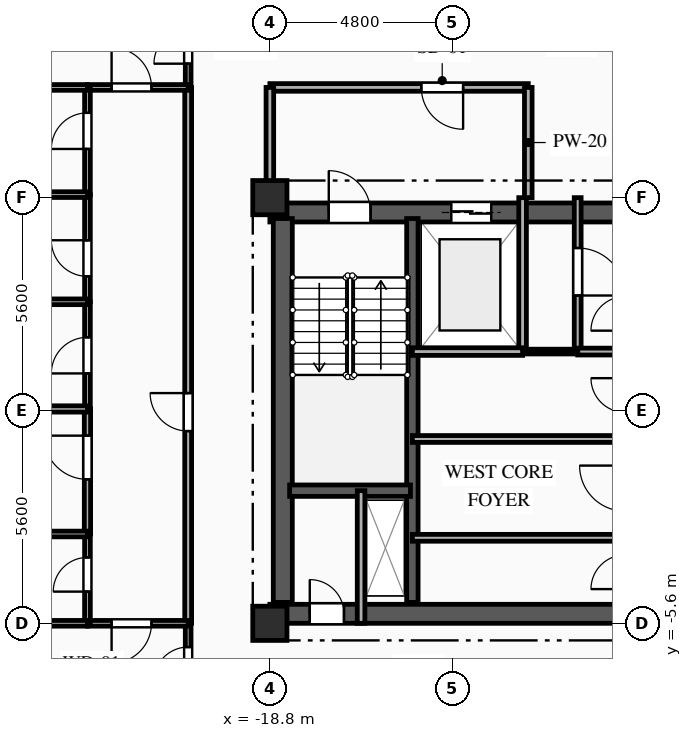
"""IFC4 building model, lengths in metres.
Left out: names, types, materials, properties, quantities, classifications, styles, units other than length and angle.
Written with IfcOpenShell. Run it as: python <this file> out.ifc"""

import sys

from ifc_helpers import new_model, si_unit, direction, frame, frame_2d, origin, origin_2d, place, context, subcontext, project, spatial, rectangle, extrude, element, fill, save


model = new_model("IFC4")
c1 = context("Model", 3, precision=1e-05, world=origin(), true_north=direction((0.0, 1.0)))
c2 = subcontext(c1, "Body", "Model", "MODEL_VIEW")
j1 = project(units=[si_unit("LENGTHUNIT", "METRE"), si_unit("PLANEANGLEUNIT", "RADIAN")], contexts=[c1])
p1 = place(None, origin())
s1 = spatial("IfcSite", under=j1, at=p1, CompositionType="ELEMENT")
p2 = place(p1, origin())
s2 = spatial("IfcBuilding", under=s1, at=p2, CompositionType="ELEMENT")
p3 = place(p2, frame((0.0, 0.0, 134.35)))
s3 = spatial("IfcBuildingStorey", under=s2, at=p3, CompositionType="ELEMENT", Elevation=134.35)
for number, where, z_axis, x_axis in (
    (1, (-18.8, -5.6, 0.0), (0.0, 0.0, 1.0), (1.0, 0.0, 0.0)),
    (2, (-18.8, 5.6, 0.0), (0.0, 0.0, 1.0), (1.0, 0.0, 0.0)),
):
    element("IfcColumn", number, at=place(p3, frame(where, z_axis=z_axis, x_axis=x_axis)), inside=s3, PredefinedType="COLUMN", context=c2, shape_type="SweptSolid", body=[
        extrude(rectangle(XDim=0.9, YDim=0.9, at=origin_2d()), origin(), (0.0, 0.0, 1.0), 3.35),
    ])
p4 = place(p3, frame((-18.8, 5.21, 0.0), z_axis=(0.0, 0.0, 1.0), x_axis=(1.0, 0.0, 0.0)))
e3 = element("IfcWall", 3, at=p4, inside=s3, PredefinedType="SHEAR", context=c2, shape_type="SweptSolid", body=[
    extrude(rectangle(XDim=9.6, YDim=0.5, at=frame_2d((4.8, 0.0))), origin(), (0.0, 0.0, 1.0), 3.04),
])
p5 = place(p4, frame((1.55, 0.0, 0.0)))
e4 = element("IfcOpeningElement", 4, at=p5, cuts=e3, PredefinedType="OPENING", context=c2, shape_type="SweptSolid", body=[
    extrude(rectangle(XDim=1.1, YDim=2.15, at=frame_2d((0.55, 1.075))), frame((0.0, 0.26, 0.0), z_axis=(0.0, -1.0, 0.0), x_axis=(1.0, 0.0, 0.0)), (0.0, 0.0, 1.0), 0.52),
])
p6 = place(p4, frame((4.775, 0.0, 0.0)))
e5 = element("IfcOpeningElement", 5, at=p6, cuts=e3, PredefinedType="OPENING", context=c2, shape_type="SweptSolid", body=[
    extrude(rectangle(XDim=1.05, YDim=2.1, at=frame_2d((0.525, 1.05))), frame((0.0, 0.26, 0.0), z_axis=(0.0, -1.0, 0.0), x_axis=(1.0, 0.0, 0.0)), (0.0, 0.0, 1.0), 0.52),
])
p7 = place(p3, frame((-18.8, -5.35, 0.0), z_axis=(0.0, 0.0, 1.0), x_axis=(1.0, 0.0, 0.0)))
e6 = element("IfcWall", 6, at=p7, inside=s3, PredefinedType="SHEAR", context=c2, shape_type="SweptSolid", body=[
    extrude(rectangle(XDim=9.6, YDim=0.5, at=frame_2d((4.8, 0.0))), origin(), (0.0, 0.0, 1.0), 3.04),
])
p8 = place(p7, frame((1.05, 0.0, 0.0)))
e7 = element("IfcOpeningElement", 7, at=p8, cuts=e6, PredefinedType="OPENING", context=c2, shape_type="SweptSolid", body=[
    extrude(rectangle(XDim=0.9, YDim=2.1, at=frame_2d((0.45, 1.05))), frame((0.0, 0.26, 0.0), z_axis=(0.0, -1.0, 0.0), x_axis=(1.0, 0.0, 0.0)), (0.0, 0.0, 1.0), 0.52),
])
p9 = place(p3, frame((-18.46, -5.05, 0.0), z_axis=(0.0, 0.0, 1.0), x_axis=(0.0, 1.0, 0.0)))
e8 = element("IfcWall", 8, at=p9, inside=s3, PredefinedType="SHEAR", context=c2, shape_type="SweptSolid", body=[
    extrude(rectangle(XDim=10.1, YDim=0.5, at=frame_2d((5.05, 0.0))), origin(), (0.0, 0.0, 1.0), 3.04),
])
p10 = place(p3, frame((-15.05, -5.05, 0.0), z_axis=(0.0, 0.0, 1.0), x_axis=(0.0, 1.0, 0.0)))
e9 = element("IfcWall", 9, at=p10, inside=s3, PredefinedType="SHEAR", context=c2, shape_type="SweptSolid", body=[
    extrude(rectangle(XDim=10.1, YDim=0.3, at=frame_2d((5.05, 0.0))), origin(), (0.0, 0.0, 1.0), 3.04),
])
p11 = place(p3, frame((-18.28, -2.11, 0.0), z_axis=(0.0, 0.0, 1.0), x_axis=(1.0, 0.0, 0.0)))
e10 = element("IfcWall", 10, at=p11, inside=s3, PredefinedType="SHEAR", context=c2, shape_type="SweptSolid", body=[
    extrude(rectangle(XDim=3.18, YDim=0.3, at=frame_2d((1.59, 0.0))), origin(), (0.0, 0.0, 1.0), 3.04),
])
p12 = place(p3, frame((-16.4, -5.6, 0.0), z_axis=(0.0, 0.0, 1.0), x_axis=(0.0, 1.0, 0.0)))
e11 = element("IfcWall", 11, at=p12, inside=s3, PredefinedType="PARTITIONING", context=c2, shape_type="SweptSolid", body=[
    extrude(rectangle(XDim=3.49, YDim=0.2, at=frame_2d((1.745, 0.0))), origin(), (0.0, 0.0, 1.0), 3.04),
])
p13 = place(p3, frame((-12.15, 1.55, 0.0), z_axis=(0.0, 0.0, 1.0), x_axis=(0.0, 1.0, 0.0)))
e12 = element("IfcWall", 12, at=p13, inside=s3, PredefinedType="PARTITIONING", context=c2, shape_type="SweptSolid", body=[
    extrude(rectangle(XDim=4.05, YDim=0.2, at=frame_2d((2.025, 0.0))), origin(), (0.0, 0.0, 1.0), 3.04),
])
p14 = place(p3, frame((-12.0, 8.5, 0.0), z_axis=(0.0, 0.0, 1.0), x_axis=(-1.0, 0.0, 0.0)))
e13 = element("IfcWall", 13, at=p14, inside=s3, PredefinedType="PARTITIONING", context=c2, shape_type="SweptSolid", body=[
    extrude(rectangle(XDim=6.8, YDim=0.2, at=frame_2d((3.4, 0.0))), origin(), (0.0, 0.0, 1.0), 3.04),
])
p15 = place(p14, frame((1.715, 0.0, 0.0)))
e14 = element("IfcOpeningElement", 14, at=p15, cuts=e13, PredefinedType="OPENING", context=c2, shape_type="SweptSolid", body=[
    extrude(rectangle(XDim=1.1, YDim=2.15, at=frame_2d((0.55, 1.075))), frame((0.0, 0.11, 0.0), z_axis=(0.0, -1.0, 0.0), x_axis=(1.0, 0.0, 0.0)), (0.0, 0.0, 1.0), 0.22),
])
p16 = place(p3, frame((-18.8, 8.5, 0.0), z_axis=(0.0, 0.0, 1.0), x_axis=(0.0, -1.0, 0.0)))
e15 = element("IfcWall", 15, at=p16, inside=s3, PredefinedType="PARTITIONING", context=c2, shape_type="SweptSolid", body=[
    extrude(rectangle(XDim=2.9, YDim=0.2, at=frame_2d((1.45, 0.0))), origin(), (0.0, 0.0, 1.0), 2.525),
])
p17 = place(p3, frame((-12.0, 5.6, 0.0), z_axis=(0.0, 0.0, 1.0), x_axis=(0.0, 1.0, 0.0)))
e16 = element("IfcWall", 16, at=p17, inside=s3, PredefinedType="PARTITIONING", context=c2, shape_type="SweptSolid", body=[
    extrude(rectangle(XDim=2.9, YDim=0.2, at=frame_2d((1.45, 0.0))), origin(), (0.0, 0.0, 1.0), 3.04),
])
p18 = place(p3, frame((-10.7, 5.6, 0.0), z_axis=(0.0, 0.0, 1.0), x_axis=(0.0, -1.0, 0.0)))
e17 = element("IfcWall", 17, at=p18, inside=s3, PredefinedType="PARTITIONING", context=c2, shape_type="SweptSolid", body=[
    extrude(rectangle(XDim=4.05, YDim=0.18, at=frame_2d((2.025, 0.0))), origin(), (0.0, 0.0, 1.0), 3.04),
])
p19 = place(p18, frame((1.325, 0.0, 0.0)))
e18 = element("IfcOpeningElement", 18, at=p19, cuts=e17, PredefinedType="OPENING", context=c2, shape_type="SweptSolid", body=[
    extrude(rectangle(XDim=1.25, YDim=2.2, at=frame_2d((0.625, 1.1))), frame((0.0, 0.1, 0.0), z_axis=(0.0, -1.0, 0.0), x_axis=(1.0, 0.0, 0.0)), (0.0, 0.0, 1.0), 0.2),
])
p20 = place(p3, frame((-10.7, 1.55, 0.0), z_axis=(0.0, 0.0, 1.0), x_axis=(1.0, 0.0, 0.0)))
e19 = element("IfcWall", 19, at=p20, inside=s3, PredefinedType="PARTITIONING", context=c2, shape_type="SweptSolid", body=[
    extrude(rectangle(XDim=1.5, YDim=0.18, at=frame_2d((0.75, 0.0))), origin(), (0.0, 0.0, 1.0), 3.04),
])
p21 = place(p3, frame((-12.15, 1.55, 0.0), z_axis=(0.0, 0.0, 1.0), x_axis=(1.0, 0.0, 0.0)))
e20 = element("IfcWall", 20, at=p21, inside=s3, PredefinedType="PARTITIONING", context=c2, shape_type="SweptSolid", body=[
    extrude(rectangle(XDim=1.45, YDim=0.125, at=frame_2d((0.725, 0.0))), origin(), (0.0, 0.0, 1.0), 3.04),
])
p22 = place(p3, frame((-15.05, -3.35, 0.0), z_axis=(0.0, 0.0, 1.0), x_axis=(1.0, 0.0, 0.0)))
e21 = element("IfcWall", 21, at=p22, inside=s3, PredefinedType="PARTITIONING", context=c2, shape_type="SweptSolid", body=[
    extrude(rectangle(XDim=5.85, YDim=0.18, at=frame_2d((2.925, 0.0))), origin(), (0.0, 0.0, 1.0), 2.755),
])
p23 = place(p3, frame((-9.2, -0.75, 0.0), z_axis=(0.0, 0.0, 1.0), x_axis=(-1.0, 0.0, 0.0)))
e22 = element("IfcWall", 22, at=p23, inside=s3, PredefinedType="PARTITIONING", context=c2, shape_type="SweptSolid", body=[
    extrude(rectangle(XDim=5.85, YDim=0.18, at=frame_2d((2.925, 0.0))), origin(), (0.0, 0.0, 1.0), 3.04),
])
p24 = place(p3, frame((-20.95, 8.5, 0.0), z_axis=(0.0, 0.0, 1.0), x_axis=(0.0, 1.0, 0.0)))
e23 = element("IfcWall", 23, at=p24, inside=s3, PredefinedType="PARTITIONING", context=c2, shape_type="SweptSolid", body=[
    extrude(rectangle(XDim=2.15, YDim=0.15, at=frame_2d((1.075, 0.0))), origin(), (0.0, 0.0, 1.0), 3.04),
])
p25 = place(p24, frame((0.625, 0.0, 0.0)))
e24 = element("IfcOpeningElement", 24, at=p25, cuts=e23, PredefinedType="OPENING", context=c2, shape_type="SweptSolid", body=[
    extrude(rectangle(XDim=0.9, YDim=2.1, at=frame_2d((0.45, 1.05))), frame((0.0, 0.085, 0.0), z_axis=(0.0, -1.0, 0.0), x_axis=(1.0, 0.0, 0.0)), (0.0, 0.0, 1.0), 0.17),
])
p26 = place(p3, frame((-20.95, -7.75, 0.0), z_axis=(0.0, 0.0, 1.0), x_axis=(0.0, 1.0, 0.0)))
e25 = element("IfcWall", 25, at=p26, inside=s3, PredefinedType="PARTITIONING", context=c2, shape_type="SweptSolid", body=[
    extrude(rectangle(XDim=2.15, YDim=0.15, at=frame_2d((1.075, 0.0))), origin(), (0.0, 0.0, 1.0), 3.04),
])
p27 = place(p26, frame((0.625, 0.0, 0.0)))
e26 = element("IfcOpeningElement", 26, at=p27, cuts=e25, PredefinedType="OPENING", context=c2, shape_type="SweptSolid", body=[
    extrude(rectangle(XDim=0.9, YDim=2.1, at=frame_2d((0.45, 1.05))), frame((0.0, 0.085, 0.0), z_axis=(0.0, -1.0, 0.0), x_axis=(1.0, 0.0, 0.0)), (0.0, 0.0, 1.0), 0.17),
])
p28 = place(p3, frame((-20.95, -5.6, 0.0), z_axis=(0.0, 0.0, 1.0), x_axis=(0.0, 1.0, 0.0)))
e27 = element("IfcWall", 27, at=p28, inside=s3, PredefinedType="PARTITIONING", context=c2, shape_type="SweptSolid", body=[
    extrude(rectangle(XDim=14.1, YDim=0.18, at=frame_2d((7.05, 0.0))), origin(), (0.0, 0.0, 1.0), 3.04),
])
p29 = place(p28, frame((5.058, 0.0, 0.0)))
e28 = element("IfcOpeningElement", 28, at=p29, cuts=e27, PredefinedType="OPENING", context=c2, shape_type="SweptSolid", body=[
    extrude(rectangle(XDim=1.0, YDim=2.15, at=frame_2d((0.5, 1.075))), frame((0.0, 0.1, 0.0), z_axis=(0.0, -1.0, 0.0), x_axis=(1.0, 0.0, 0.0)), (0.0, 0.0, 1.0), 0.2),
])
p30 = place(p3, frame((-23.6, 8.5, 0.0), z_axis=(0.0, 0.0, 1.0), x_axis=(1.0, 0.0, 0.0)))
e29 = element("IfcWall", 29, at=p30, inside=s3, PredefinedType="PARTITIONING", context=c2, shape_type="SweptSolid", body=[
    extrude(rectangle(XDim=2.65, YDim=0.15, at=frame_2d((1.325, 0.0))), origin(), (0.0, 0.0, 1.0), 3.04),
])
p31 = place(p30, frame((0.635, 0.0, 0.0)))
e30 = element("IfcOpeningElement", 30, at=p31, cuts=e29, PredefinedType="OPENING", context=c2, shape_type="SweptSolid", body=[
    extrude(rectangle(XDim=1.05, YDim=2.15, at=frame_2d((0.525, 1.075))), frame((0.0, 0.085, 0.0), z_axis=(0.0, -1.0, 0.0), x_axis=(1.0, 0.0, 0.0)), (0.0, 0.0, 1.0), 0.17),
])
p32 = place(p3, frame((-20.95, -5.6, 0.0), z_axis=(0.0, 0.0, 1.0), x_axis=(-1.0, 0.0, 0.0)))
e31 = element("IfcWall", 31, at=p32, inside=s3, PredefinedType="PARTITIONING", context=c2, shape_type="SweptSolid", body=[
    extrude(rectangle(XDim=2.65, YDim=0.15, at=frame_2d((1.325, 0.0))), origin(), (0.0, 0.0, 1.0), 3.04),
])
p33 = place(p32, frame((0.965, 0.0, 0.0)))
e32 = element("IfcOpeningElement", 32, at=p33, cuts=e31, PredefinedType="OPENING", context=c2, shape_type="SweptSolid", body=[
    extrude(rectangle(XDim=1.05, YDim=2.15, at=frame_2d((0.525, 1.075))), frame((0.0, 0.085, 0.0), z_axis=(0.0, -1.0, 0.0), x_axis=(1.0, 0.0, 0.0)), (0.0, 0.0, 1.0), 0.17),
])
p34 = place(p3, frame((-23.6, -5.6, 0.0), z_axis=(0.0, 0.0, 1.0), x_axis=(0.0, 1.0, 0.0)))
e33 = element("IfcWall", 33, at=p34, inside=s3, PredefinedType="PLUMBINGWALL", context=c2, shape_type="SweptSolid", body=[
    extrude(rectangle(XDim=2.35, YDim=0.15, at=frame_2d((1.175, 0.0))), origin(), (0.0, 0.0, 1.0), 2.695),
])
p35 = place(p34, frame((0.834, 0.0, 0.0)))
e34 = element("IfcOpeningElement", 34, at=p35, cuts=e33, PredefinedType="OPENING", context=c2, shape_type="SweptSolid", body=[
    extrude(rectangle(XDim=0.9, YDim=2.1, at=frame_2d((0.45, 1.05))), frame((0.0, 0.085, 0.0), z_axis=(0.0, -1.0, 0.0), x_axis=(1.0, 0.0, 0.0)), (0.0, 0.0, 1.0), 0.17),
])
p36 = place(p3, frame((-23.6, -3.25, 0.0), z_axis=(0.0, 0.0, 1.0), x_axis=(0.0, 1.0, 0.0)))
e35 = element("IfcWall", 35, at=p36, inside=s3, PredefinedType="PARTITIONING", context=c2, shape_type="SweptSolid", body=[
    extrude(rectangle(XDim=3.29, YDim=0.165, at=frame_2d((1.645, 0.0))), origin(), (0.0, 0.0, 1.0), 2.695),
])
p37 = place(p36, frame((1.438, 0.0, 0.0)))
e36 = element("IfcOpeningElement", 36, at=p37, cuts=e35, PredefinedType="OPENING", context=c2, shape_type="SweptSolid", body=[
    extrude(rectangle(XDim=1.15, YDim=2.15, at=frame_2d((0.575, 1.075))), frame((0.0, 0.093, 0.0), z_axis=(0.0, -1.0, 0.0), x_axis=(1.0, 0.0, 0.0)), (0.0, 0.0, 1.0), 0.185),
])
p38 = place(p3, frame((-23.6, 0.04, 0.0), z_axis=(0.0, 0.0, 1.0), x_axis=(0.0, 1.0, 0.0)))
e37 = element("IfcWall", 37, at=p38, inside=s3, PredefinedType="PARTITIONING", context=c2, shape_type="SweptSolid", body=[
    extrude(rectangle(XDim=2.82, YDim=0.15, at=frame_2d((1.41, 0.0))), origin(), (0.0, 0.0, 1.0), 2.695),
])
p39 = place(p38, frame((0.935, 0.0, 0.0)))
e38 = element("IfcOpeningElement", 38, at=p39, cuts=e37, PredefinedType="OPENING", context=c2, shape_type="SweptSolid", body=[
    extrude(rectangle(XDim=0.95, YDim=2.1, at=frame_2d((0.475, 1.05))), frame((0.0, 0.085, 0.0), z_axis=(0.0, -1.0, 0.0), x_axis=(1.0, 0.0, 0.0)), (0.0, 0.0, 1.0), 0.17),
])
p40 = place(p3, frame((-23.6, 2.86, 0.0), z_axis=(0.0, 0.0, 1.0), x_axis=(0.0, 1.0, 0.0)))
e39 = element("IfcWall", 39, at=p40, inside=s3, PredefinedType="PARTITIONING", context=c2, shape_type="SweptSolid", body=[
    extrude(rectangle(XDim=2.82, YDim=0.15, at=frame_2d((1.41, 0.0))), origin(), (0.0, 0.0, 1.0), 2.695),
])
p41 = place(p40, frame((0.669, 0.0, 0.0)))
e40 = element("IfcOpeningElement", 40, at=p41, cuts=e39, PredefinedType="OPENING", context=c2, shape_type="SweptSolid", body=[
    extrude(rectangle(XDim=0.95, YDim=2.1, at=frame_2d((0.475, 1.05))), frame((0.0, 0.085, 0.0), z_axis=(0.0, -1.0, 0.0), x_axis=(1.0, 0.0, 0.0)), (0.0, 0.0, 1.0), 0.17),
])
p42 = place(p3, frame((-23.6, 5.68, 0.0), z_axis=(0.0, 0.0, 1.0), x_axis=(0.0, 1.0, 0.0)))
e41 = element("IfcWall", 41, at=p42, inside=s3, PredefinedType="PARTITIONING", context=c2, shape_type="SweptSolid", body=[
    extrude(rectangle(XDim=2.82, YDim=0.15, at=frame_2d((1.41, 0.0))), origin(), (0.0, 0.0, 1.0), 2.695),
])
p43 = place(p42, frame((1.201, 0.0, 0.0)))
e42 = element("IfcOpeningElement", 42, at=p43, cuts=e41, PredefinedType="OPENING", context=c2, shape_type="SweptSolid", body=[
    extrude(rectangle(XDim=0.95, YDim=2.1, at=frame_2d((0.475, 1.05))), frame((0.0, 0.085, 0.0), z_axis=(0.0, -1.0, 0.0), x_axis=(1.0, 0.0, 0.0)), (0.0, 0.0, 1.0), 0.17),
])
p44 = place(p3, frame((-23.6, 8.5, 0.0), z_axis=(0.0, 0.0, 1.0), x_axis=(-1.0, 0.0, 0.0)))
e43 = element("IfcWall", 43, at=p44, inside=s3, PredefinedType="PARTITIONING", context=c2, shape_type="SweptSolid", body=[
    extrude(rectangle(XDim=1.165, YDim=0.15, at=frame_2d((0.583, 0.0))), origin(), (0.0, 0.0, 1.0), 3.04),
])
for number, where, z_axis, x_axis in (
    (44, (-29.0, -5.6, 0.0), (0.0, 0.0, 1.0), (1.0, 0.0, 0.0)),
    (45, (-29.0, -3.25, 0.0), (0.0, 0.0, 1.0), (1.0, 0.0, 0.0)),
):
    element("IfcWall", number, at=place(p3, frame(where, z_axis=z_axis, x_axis=x_axis)), inside=s3, PredefinedType="PLUMBINGWALL", context=c2, shape_type="SweptSolid", body=[
        extrude(rectangle(XDim=5.4, YDim=0.15, at=frame_2d((2.7, 0.0))), origin(), (0.0, 0.0, 1.0), 3.04),
    ])
p45 = place(p3, frame((-29.0, 0.04, 0.0), z_axis=(0.0, 0.0, 1.0), x_axis=(1.0, 0.0, 0.0)))
e46 = element("IfcWall", 46, at=p45, inside=s3, PredefinedType="PARTITIONING", context=c2, shape_type="SweptSolid", body=[
    extrude(rectangle(XDim=5.4, YDim=0.165, at=frame_2d((2.7, 0.0))), origin(), (0.0, 0.0, 1.0), 3.04),
])
for number, where, z_axis, x_axis in (
    (47, (-29.0, 2.86, 0.0), (0.0, 0.0, 1.0), (1.0, 0.0, 0.0)),
    (48, (-29.0, 5.68, 0.0), (0.0, 0.0, 1.0), (1.0, 0.0, 0.0)),
):
    element("IfcWall", number, at=place(p3, frame(where, z_axis=z_axis, x_axis=x_axis)), inside=s3, PredefinedType="PARTITIONING", context=c2, shape_type="SweptSolid", body=[
        extrude(rectangle(XDim=5.4, YDim=0.15, at=frame_2d((2.7, 0.0))), origin(), (0.0, 0.0, 1.0), 3.04),
    ])
p46 = place(p3, frame((-15.05, 1.55, 0.0), z_axis=(0.0, 0.0, 1.0), x_axis=(1.0, 0.0, 0.0)))
e49 = element("IfcWall", 49, at=p46, inside=s3, PredefinedType="PARTITIONING", context=c2, shape_type="SweptSolid", body=[
    extrude(rectangle(XDim=2.9, YDim=0.2, at=frame_2d((1.45, 0.0))), origin(), (0.0, 0.0, 1.0), 3.04),
])
p47 = place(p5, origin())
e50 = element("IfcDoor", 50, at=p47, inside=s3, OperationType="SINGLE_SWING_LEFT", PredefinedType="DOOR", context=c2, shape_type="SweptSolid", body=[
    extrude(rectangle(XDim=1.1, YDim=2.15, at=frame_2d((0.55, 1.075))), frame((0.0, 0.025, 0.0), z_axis=(0.0, -1.0, 0.0), x_axis=(1.0, 0.0, 0.0)), (0.0, 0.0, 1.0), 0.05),
])
fill(e4, e50)
p48 = place(p6, origin())
e51 = element("IfcDoor", 51, at=p48, inside=s3, OperationType="DOUBLE_DOOR_SLIDING", PredefinedType="DOOR", context=c2, shape_type="SweptSolid", body=[
    extrude(rectangle(XDim=1.05, YDim=2.1, at=frame_2d((0.525, 1.05))), frame((0.0, 0.025, 0.0), z_axis=(0.0, -1.0, 0.0), x_axis=(1.0, 0.0, 0.0)), (0.0, 0.0, 1.0), 0.05),
])
fill(e5, e51)
p49 = place(p8, origin())
e52 = element("IfcDoor", 52, at=p49, inside=s3, OperationType="SINGLE_SWING_LEFT", PredefinedType="DOOR", context=c2, shape_type="SweptSolid", body=[
    extrude(rectangle(XDim=0.9, YDim=2.1, at=frame_2d((0.45, 1.05))), frame((0.0, 0.025, 0.0), z_axis=(0.0, -1.0, 0.0), x_axis=(1.0, 0.0, 0.0)), (0.0, 0.0, 1.0), 0.05),
])
fill(e7, e52)
p50 = place(p15, origin())
e53 = element("IfcDoor", 53, at=p50, inside=s3, OperationType="SINGLE_SWING_LEFT", PredefinedType="DOOR", context=c2, shape_type="SweptSolid", body=[
    extrude(rectangle(XDim=1.1, YDim=2.15, at=frame_2d((0.55, 1.075))), frame((0.0, 0.025, 0.0), z_axis=(0.0, -1.0, 0.0), x_axis=(1.0, 0.0, 0.0)), (0.0, 0.0, 1.0), 0.05),
])
fill(e14, e53)
p51 = place(p19, origin())
e54 = element("IfcDoor", 54, at=p51, inside=s3, OperationType="SINGLE_SWING_RIGHT", PredefinedType="DOOR", context=c2, shape_type="SweptSolid", body=[
    extrude(rectangle(XDim=1.25, YDim=2.2, at=frame_2d((0.625, 1.1))), frame((0.0, 0.025, 0.0), z_axis=(0.0, -1.0, 0.0), x_axis=(1.0, 0.0, 0.0)), (0.0, 0.0, 1.0), 0.05),
])
fill(e18, e54)
p52 = place(p25, origin())
e55 = element("IfcDoor", 55, at=p52, inside=s3, OperationType="SINGLE_SWING_LEFT", PredefinedType="DOOR", context=c2, shape_type="SweptSolid", body=[
    extrude(rectangle(XDim=0.9, YDim=2.1, at=frame_2d((0.45, 1.05))), frame((0.0, 0.025, 0.0), z_axis=(0.0, -1.0, 0.0), x_axis=(1.0, 0.0, 0.0)), (0.0, 0.0, 1.0), 0.05),
])
fill(e24, e55)
p53 = place(p27, origin())
e56 = element("IfcDoor", 56, at=p53, inside=s3, OperationType="SINGLE_SWING_LEFT", PredefinedType="DOOR", context=c2, shape_type="SweptSolid", body=[
    extrude(rectangle(XDim=0.9, YDim=2.1, at=frame_2d((0.45, 1.05))), frame((0.0, 0.025, 0.0), z_axis=(0.0, -1.0, 0.0), x_axis=(1.0, 0.0, 0.0)), (0.0, 0.0, 1.0), 0.05),
])
fill(e26, e56)
p54 = place(p29, origin())
e57 = element("IfcDoor", 57, at=p54, inside=s3, OperationType="SINGLE_SWING_RIGHT", PredefinedType="DOOR", context=c2, shape_type="SweptSolid", body=[
    extrude(rectangle(XDim=1.0, YDim=2.15, at=frame_2d((0.5, 1.075))), frame((0.0, 0.025, 0.0), z_axis=(0.0, -1.0, 0.0), x_axis=(1.0, 0.0, 0.0)), (0.0, 0.0, 1.0), 0.05),
])
fill(e28, e57)
p55 = place(p31, origin())
e58 = element("IfcDoor", 58, at=p55, inside=s3, OperationType="SINGLE_SWING_LEFT", PredefinedType="DOOR", context=c2, shape_type="SweptSolid", body=[
    extrude(rectangle(XDim=1.05, YDim=2.15, at=frame_2d((0.525, 1.075))), frame((0.0, 0.025, 0.0), z_axis=(0.0, -1.0, 0.0), x_axis=(1.0, 0.0, 0.0)), (0.0, 0.0, 1.0), 0.05),
])
fill(e30, e58)
p56 = place(p33, origin())
e59 = element("IfcDoor", 59, at=p56, inside=s3, OperationType="SINGLE_SWING_RIGHT", PredefinedType="DOOR", context=c2, shape_type="SweptSolid", body=[
    extrude(rectangle(XDim=1.05, YDim=2.15, at=frame_2d((0.525, 1.075))), frame((0.0, 0.025, 0.0), z_axis=(0.0, -1.0, 0.0), x_axis=(1.0, 0.0, 0.0)), (0.0, 0.0, 1.0), 0.05),
])
fill(e32, e59)
p57 = place(p35, origin())
e60 = element("IfcDoor", 60, at=p57, inside=s3, OperationType="SINGLE_SWING_LEFT", PredefinedType="DOOR", context=c2, shape_type="SweptSolid", body=[
    extrude(rectangle(XDim=0.9, YDim=2.1, at=frame_2d((0.45, 1.05))), frame((0.0, 0.025, 0.0), z_axis=(0.0, -1.0, 0.0), x_axis=(1.0, 0.0, 0.0)), (0.0, 0.0, 1.0), 0.05),
])
fill(e34, e60)
p58 = place(p37, origin())
e61 = element("IfcDoor", 61, at=p58, inside=s3, OperationType="SINGLE_SWING_RIGHT", PredefinedType="DOOR", context=c2, shape_type="SweptSolid", body=[
    extrude(rectangle(XDim=1.15, YDim=2.15, at=frame_2d((0.575, 1.075))), frame((0.0, 0.025, 0.0), z_axis=(0.0, -1.0, 0.0), x_axis=(1.0, 0.0, 0.0)), (0.0, 0.0, 1.0), 0.05),
])
fill(e36, e61)
p59 = place(p39, origin())
e62 = element("IfcDoor", 62, at=p59, inside=s3, OperationType="SINGLE_SWING_LEFT", PredefinedType="DOOR", context=c2, shape_type="SweptSolid", body=[
    extrude(rectangle(XDim=0.95, YDim=2.1, at=frame_2d((0.475, 1.05))), frame((0.0, 0.025, 0.0), z_axis=(0.0, -1.0, 0.0), x_axis=(1.0, 0.0, 0.0)), (0.0, 0.0, 1.0), 0.05),
])
fill(e38, e62)
p60 = place(p41, origin())
e63 = element("IfcDoor", 63, at=p60, inside=s3, OperationType="SINGLE_SWING_RIGHT", PredefinedType="DOOR", context=c2, shape_type="SweptSolid", body=[
    extrude(rectangle(XDim=0.95, YDim=2.1, at=frame_2d((0.475, 1.05))), frame((0.0, 0.025, 0.0), z_axis=(0.0, -1.0, 0.0), x_axis=(1.0, 0.0, 0.0)), (0.0, 0.0, 1.0), 0.05),
])
fill(e40, e63)
p61 = place(p43, origin())
e64 = element("IfcDoor", 64, at=p61, inside=s3, OperationType="SINGLE_SWING_LEFT", PredefinedType="DOOR", context=c2, shape_type="SweptSolid", body=[
    extrude(rectangle(XDim=0.95, YDim=2.1, at=frame_2d((0.475, 1.05))), frame((0.0, 0.025, 0.0), z_axis=(0.0, -1.0, 0.0), x_axis=(1.0, 0.0, 0.0)), (0.0, 0.0, 1.0), 0.05),
])
fill(e42, e64)
save(model, sys.argv[1])
